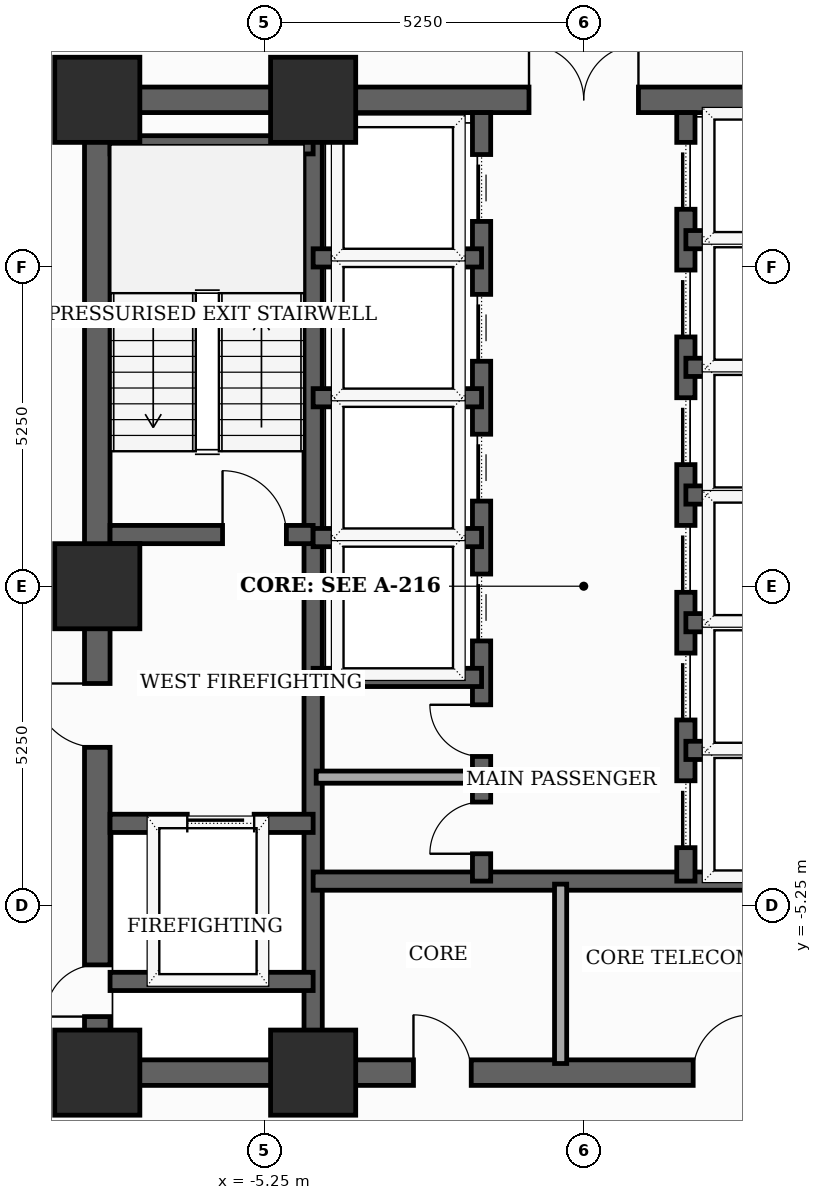
"""IFC4 building model, lengths in metres.
Left out: names, types, materials, properties, quantities, classifications, styles, units other than length and angle.
Written with IfcOpenShell. Run it as: python <this file> out.ifc"""

import sys

from ifc_helpers import new_model, si_unit, direction, frame, frame_2d, origin, origin_2d, place, context, subcontext, project, spatial, rectangle, extrude, element, fill, save


model = new_model("IFC4")
c1 = context("Model", 3, precision=1e-05, world=origin(), true_north=direction((0.0, 1.0)))
c2 = subcontext(c1, "Body", "Model", "MODEL_VIEW")
j1 = project(units=[si_unit("LENGTHUNIT", "METRE"), si_unit("PLANEANGLEUNIT", "RADIAN")], contexts=[c1])
p1 = place(None, origin())
s1 = spatial("IfcSite", under=j1, at=p1, CompositionType="ELEMENT")
p2 = place(p1, origin())
s2 = spatial("IfcBuilding", under=s1, at=p2, CompositionType="ELEMENT")
p3 = place(p2, frame((0.0, 0.0, 97.7)))
s3 = spatial("IfcBuildingStorey", under=s2, at=p3, CompositionType="ELEMENT", Elevation=97.7)
for number, where, z_axis, x_axis in (
    (1, (-8.0, -8.0, 0.0), (0.0, 0.0, 1.0), (1.0, 0.0, 0.0)),
    (2, (-4.45, -8.0, 0.0), (0.0, 0.0, 1.0), (1.0, 0.0, 0.0)),
    (3, (-4.45, 8.0, 0.0), (0.0, 0.0, 1.0), (1.0, 0.0, 0.0)),
    (4, (-8.0, 8.0, 0.0), (0.0, 0.0, 1.0), (1.0, 0.0, 0.0)),
    (5, (-8.0, 0.0, 0.0), (0.0, 0.0, 1.0), (1.0, 0.0, 0.0)),
):
    element("IfcColumn", number, at=place(p3, frame(where, z_axis=z_axis, x_axis=x_axis)), inside=s3, PredefinedType="COLUMN", context=c2, shape_type="SweptSolid", body=[
        extrude(rectangle(XDim=1.4, YDim=1.4, at=origin_2d()), origin(), (0.0, 0.0, 1.0), 3.7),
    ])
p4 = place(p3, frame((-8.0, -8.0, 0.0), z_axis=(0.0, 0.0, 1.0), x_axis=(0.0, 1.0, 0.0)))
e6 = element("IfcWall", 6, at=p4, inside=s3, PredefinedType="SHEAR", context=c2, shape_type="SweptSolid", body=[
    extrude(rectangle(XDim=16.0, YDim=0.42, at=frame_2d((8.0, 0.0))), origin(), (0.0, 0.0, 1.0), 3.5),
])
p5 = place(p4, frame((0.922, 0.0, 0.0)))
e7 = element("IfcOpeningElement", 7, at=p5, cuts=e6, PredefinedType="OPENING", context=c2, shape_type="SweptSolid", body=[
    extrude(rectangle(XDim=0.85, YDim=2.02, at=frame_2d((0.425, 1.01))), frame((0.0, 0.22, 0.0), z_axis=(0.0, -1.0, 0.0), x_axis=(1.0, 0.0, 0.0)), (0.0, 0.0, 1.0), 0.44),
])
p6 = place(p4, frame((5.35, 0.0, 0.0)))
e8 = element("IfcOpeningElement", 8, at=p6, cuts=e6, PredefinedType="OPENING", context=c2, shape_type="SweptSolid", body=[
    extrude(rectangle(XDim=1.05, YDim=2.15, at=frame_2d((0.525, 1.075))), frame((0.0, 0.22, 0.0), z_axis=(0.0, -1.0, 0.0), x_axis=(1.0, 0.0, 0.0)), (0.0, 0.0, 1.0), 0.44),
])
p7 = place(p3, frame((-8.0, -8.0, 0.0), z_axis=(0.0, 0.0, 1.0), x_axis=(1.0, 0.0, 0.0)))
e9 = element("IfcWall", 9, at=p7, inside=s3, PredefinedType="SHEAR", context=c2, shape_type="SweptSolid", body=[
    extrude(rectangle(XDim=16.0, YDim=0.42, at=frame_2d((8.0, 0.0))), origin(), (0.0, 0.0, 1.0), 3.5),
])
p8 = place(p7, frame((5.2, 0.0, 0.0)))
e10 = element("IfcOpeningElement", 10, at=p8, cuts=e9, PredefinedType="OPENING", context=c2, shape_type="SweptSolid", body=[
    extrude(rectangle(XDim=0.95, YDim=2.1, at=frame_2d((0.475, 1.05))), frame((0.0, 0.22, 0.0), z_axis=(0.0, -1.0, 0.0), x_axis=(1.0, 0.0, 0.0)), (0.0, 0.0, 1.0), 0.44),
])
p9 = place(p7, frame((9.8, 0.0, 0.0)))
e11 = element("IfcOpeningElement", 11, at=p9, cuts=e9, PredefinedType="OPENING", context=c2, shape_type="SweptSolid", body=[
    extrude(rectangle(XDim=0.95, YDim=2.1, at=frame_2d((0.475, 1.05))), frame((0.0, 0.22, 0.0), z_axis=(0.0, -1.0, 0.0), x_axis=(1.0, 0.0, 0.0)), (0.0, 0.0, 1.0), 0.44),
])
p10 = place(p3, frame((-8.0, 8.0, 0.0), z_axis=(0.0, 0.0, 1.0), x_axis=(1.0, 0.0, 0.0)))
e12 = element("IfcWall", 12, at=p10, inside=s3, PredefinedType="SHEAR", context=c2, shape_type="SweptSolid", body=[
    extrude(rectangle(XDim=16.0, YDim=0.42, at=frame_2d((8.0, 0.0))), origin(), (0.0, 0.0, 1.0), 3.5),
])
p11 = place(p10, frame((7.1, 0.0, 0.0)))
e13 = element("IfcOpeningElement", 13, at=p11, cuts=e12, PredefinedType="OPENING", context=c2, shape_type="SweptSolid", body=[
    extrude(rectangle(XDim=1.8, YDim=2.15, at=frame_2d((0.9, 1.075))), frame((0.0, 0.22, 0.0), z_axis=(0.0, -1.0, 0.0), x_axis=(1.0, 0.0, 0.0)), (0.0, 0.0, 1.0), 0.44),
])
p12 = place(p3, frame((-4.45, -7.79, 0.0), z_axis=(0.0, 0.0, 1.0), x_axis=(0.0, 1.0, 0.0)))
e14 = element("IfcWall", 14, at=p12, inside=s3, PredefinedType="SHEAR", context=c2, shape_type="SweptSolid", body=[
    extrude(rectangle(XDim=15.58, YDim=0.3, at=frame_2d((7.79, 0.0))), origin(), (0.0, 0.0, 1.0), 3.5),
])
p13 = place(p3, frame((-7.79, 0.85, 0.0), z_axis=(0.0, 0.0, 1.0), x_axis=(1.0, 0.0, 0.0)))
e15 = element("IfcWall", 15, at=p13, inside=s3, PredefinedType="SHEAR", context=c2, shape_type="SweptSolid", body=[
    extrude(rectangle(XDim=3.34, YDim=0.3, at=frame_2d((1.67, 0.0))), origin(), (0.0, 0.0, 1.0), 3.5),
])
p14 = place(p13, frame((1.85, 0.0, 0.0)))
e16 = element("IfcOpeningElement", 16, at=p14, cuts=e15, PredefinedType="OPENING", context=c2, shape_type="SweptSolid", body=[
    extrude(rectangle(XDim=1.05, YDim=2.15, at=frame_2d((0.525, 1.075))), frame((0.0, 0.16, 0.0), z_axis=(0.0, -1.0, 0.0), x_axis=(1.0, 0.0, 0.0)), (0.0, 0.0, 1.0), 0.32),
])
p15 = place(p3, frame((-7.79, 7.26, 0.0), z_axis=(0.0, 0.0, 1.0), x_axis=(1.0, 0.0, 0.0)))
e17 = element("IfcWall", 17, at=p15, inside=s3, PredefinedType="SHEAR", context=c2, shape_type="SweptSolid", body=[
    extrude(rectangle(XDim=3.34, YDim=0.3, at=frame_2d((1.67, 0.0))), origin(), (0.0, 0.0, 1.0), 3.5),
])
p16 = place(p3, frame((-7.79, -3.9, 0.0), z_axis=(0.0, 0.0, 1.0), x_axis=(1.0, 0.0, 0.0)))
e18 = element("IfcWall", 18, at=p16, inside=s3, PredefinedType="SHEAR", context=c2, shape_type="SweptSolid", body=[
    extrude(rectangle(XDim=3.34, YDim=0.3, at=frame_2d((1.67, 0.0))), origin(), (0.0, 0.0, 1.0), 3.5),
])
p17 = place(p16, frame((1.27, 0.0, 0.0)))
e19 = element("IfcOpeningElement", 19, at=p17, cuts=e18, PredefinedType="OPENING", context=c2, shape_type="SweptSolid", body=[
    extrude(rectangle(XDim=1.1, YDim=2.1, at=frame_2d((0.55, 1.05))), frame((0.0, 0.16, 0.0), z_axis=(0.0, -1.0, 0.0), x_axis=(1.0, 0.0, 0.0)), (0.0, 0.0, 1.0), 0.32),
])
p18 = place(p3, frame((-7.79, -6.5, 0.0), z_axis=(0.0, 0.0, 1.0), x_axis=(1.0, 0.0, 0.0)))
e20 = element("IfcWall", 20, at=p18, inside=s3, PredefinedType="SHEAR", context=c2, shape_type="SweptSolid", body=[
    extrude(rectangle(XDim=3.34, YDim=0.3, at=frame_2d((1.67, 0.0))), origin(), (0.0, 0.0, 1.0), 3.5),
])
p19 = place(p3, frame((-4.45, -4.85, 0.0), z_axis=(0.0, 0.0, 1.0), x_axis=(1.0, 0.0, 0.0)))
e21 = element("IfcWall", 21, at=p19, inside=s3, PredefinedType="SHEAR", context=c2, shape_type="SweptSolid", body=[
    extrude(rectangle(XDim=8.9, YDim=0.3, at=frame_2d((4.45, 0.0))), origin(), (0.0, 0.0, 1.0), 3.5),
])
p20 = place(p3, frame((-1.68, -4.85, 0.0), z_axis=(0.0, 0.0, 1.0), x_axis=(0.0, 1.0, 0.0)))
e22 = element("IfcWall", 22, at=p20, inside=s3, PredefinedType="SHEAR", context=c2, shape_type="SweptSolid", body=[
    extrude(rectangle(XDim=12.64, YDim=0.3, at=frame_2d((6.32, 0.0))), origin(), (0.0, 0.0, 1.0), 3.5),
])
p21 = place(p20, frame((3.95, 0.0, 0.0)))
e23 = element("IfcOpeningElement", 23, at=p21, cuts=e22, PredefinedType="OPENING", context=c2, shape_type="SweptSolid", body=[
    extrude(rectangle(XDim=1.1, YDim=2.1, at=frame_2d((0.55, 1.05))), frame((0.0, 0.16, 0.0), z_axis=(0.0, -1.0, 0.0), x_axis=(1.0, 0.0, 0.0)), (0.0, 0.0, 1.0), 0.32),
])
p22 = place(p20, frame((6.25, 0.0, 0.0)))
e24 = element("IfcOpeningElement", 24, at=p22, cuts=e22, PredefinedType="OPENING", context=c2, shape_type="SweptSolid", body=[
    extrude(rectangle(XDim=1.1, YDim=2.1, at=frame_2d((0.55, 1.05))), frame((0.0, 0.16, 0.0), z_axis=(0.0, -1.0, 0.0), x_axis=(1.0, 0.0, 0.0)), (0.0, 0.0, 1.0), 0.32),
])
p23 = place(p20, frame((8.55, 0.0, 0.0)))
e25 = element("IfcOpeningElement", 25, at=p23, cuts=e22, PredefinedType="OPENING", context=c2, shape_type="SweptSolid", body=[
    extrude(rectangle(XDim=1.1, YDim=2.1, at=frame_2d((0.55, 1.05))), frame((0.0, 0.16, 0.0), z_axis=(0.0, -1.0, 0.0), x_axis=(1.0, 0.0, 0.0)), (0.0, 0.0, 1.0), 0.32),
])
p24 = place(p20, frame((10.85, 0.0, 0.0)))
e26 = element("IfcOpeningElement", 26, at=p24, cuts=e22, PredefinedType="OPENING", context=c2, shape_type="SweptSolid", body=[
    extrude(rectangle(XDim=1.1, YDim=2.1, at=frame_2d((0.55, 1.05))), frame((0.0, 0.16, 0.0), z_axis=(0.0, -1.0, 0.0), x_axis=(1.0, 0.0, 0.0)), (0.0, 0.0, 1.0), 0.32),
])
p25 = place(p20, frame((0.45, 0.0, 0.0)))
e27 = element("IfcOpeningElement", 27, at=p25, cuts=e22, PredefinedType="OPENING", context=c2, shape_type="SweptSolid", body=[
    extrude(rectangle(XDim=0.85, YDim=2.02, at=frame_2d((0.425, 1.01))), frame((0.0, 0.16, 0.0), z_axis=(0.0, -1.0, 0.0), x_axis=(1.0, 0.0, 0.0)), (0.0, 0.0, 1.0), 0.32),
])
p26 = place(p20, frame((2.05, 0.0, 0.0)))
e28 = element("IfcOpeningElement", 28, at=p26, cuts=e22, PredefinedType="OPENING", context=c2, shape_type="SweptSolid", body=[
    extrude(rectangle(XDim=0.85, YDim=2.02, at=frame_2d((0.425, 1.01))), frame((0.0, 0.16, 0.0), z_axis=(0.0, -1.0, 0.0), x_axis=(1.0, 0.0, 0.0)), (0.0, 0.0, 1.0), 0.32),
])
p27 = place(p3, frame((1.68, -4.85, 0.0), z_axis=(0.0, 0.0, 1.0), x_axis=(0.0, 1.0, 0.0)))
e29 = element("IfcWall", 29, at=p27, inside=s3, PredefinedType="SHEAR", context=c2, shape_type="SweptSolid", body=[
    extrude(rectangle(XDim=12.64, YDim=0.3, at=frame_2d((6.32, 0.0))), origin(), (0.0, 0.0, 1.0), 3.5),
])
p28 = place(p27, frame((0.55, 0.0, 0.0)))
e30 = element("IfcOpeningElement", 30, at=p28, cuts=e29, PredefinedType="OPENING", context=c2, shape_type="SweptSolid", body=[
    extrude(rectangle(XDim=1.1, YDim=2.1, at=frame_2d((0.55, 1.05))), frame((0.0, 0.16, 0.0), z_axis=(0.0, -1.0, 0.0), x_axis=(1.0, 0.0, 0.0)), (0.0, 0.0, 1.0), 0.32),
])
p29 = place(p27, frame((2.65, 0.0, 0.0)))
e31 = element("IfcOpeningElement", 31, at=p29, cuts=e29, PredefinedType="OPENING", context=c2, shape_type="SweptSolid", body=[
    extrude(rectangle(XDim=1.1, YDim=2.1, at=frame_2d((0.55, 1.05))), frame((0.0, 0.16, 0.0), z_axis=(0.0, -1.0, 0.0), x_axis=(1.0, 0.0, 0.0)), (0.0, 0.0, 1.0), 0.32),
])
p30 = place(p27, frame((4.75, 0.0, 0.0)))
e32 = element("IfcOpeningElement", 32, at=p30, cuts=e29, PredefinedType="OPENING", context=c2, shape_type="SweptSolid", body=[
    extrude(rectangle(XDim=1.1, YDim=2.1, at=frame_2d((0.55, 1.05))), frame((0.0, 0.16, 0.0), z_axis=(0.0, -1.0, 0.0), x_axis=(1.0, 0.0, 0.0)), (0.0, 0.0, 1.0), 0.32),
])
p31 = place(p27, frame((6.85, 0.0, 0.0)))
e33 = element("IfcOpeningElement", 33, at=p31, cuts=e29, PredefinedType="OPENING", context=c2, shape_type="SweptSolid", body=[
    extrude(rectangle(XDim=1.1, YDim=2.1, at=frame_2d((0.55, 1.05))), frame((0.0, 0.16, 0.0), z_axis=(0.0, -1.0, 0.0), x_axis=(1.0, 0.0, 0.0)), (0.0, 0.0, 1.0), 0.32),
])
p32 = place(p27, frame((8.95, 0.0, 0.0)))
e34 = element("IfcOpeningElement", 34, at=p32, cuts=e29, PredefinedType="OPENING", context=c2, shape_type="SweptSolid", body=[
    extrude(rectangle(XDim=1.1, YDim=2.1, at=frame_2d((0.55, 1.05))), frame((0.0, 0.16, 0.0), z_axis=(0.0, -1.0, 0.0), x_axis=(1.0, 0.0, 0.0)), (0.0, 0.0, 1.0), 0.32),
])
p33 = place(p27, frame((11.05, 0.0, 0.0)))
e35 = element("IfcOpeningElement", 35, at=p33, cuts=e29, PredefinedType="OPENING", context=c2, shape_type="SweptSolid", body=[
    extrude(rectangle(XDim=1.1, YDim=2.1, at=frame_2d((0.55, 1.05))), frame((0.0, 0.16, 0.0), z_axis=(0.0, -1.0, 0.0), x_axis=(1.0, 0.0, 0.0)), (0.0, 0.0, 1.0), 0.32),
])
for number, where, z_axis, x_axis in (
    (36, (-4.45, -1.5, 0.0), (0.0, 0.0, 1.0), (1.0, 0.0, 0.0)),
    (37, (-4.45, 0.8, 0.0), (0.0, 0.0, 1.0), (1.0, 0.0, 0.0)),
    (38, (-4.45, 3.1, 0.0), (0.0, 0.0, 1.0), (1.0, 0.0, 0.0)),
    (39, (-4.45, 5.4, 0.0), (0.0, 0.0, 1.0), (1.0, 0.0, 0.0)),
    (40, (1.68, 1.5, 0.0), (0.0, 0.0, 1.0), (1.0, 0.0, 0.0)),
    (41, (1.68, 3.6, 0.0), (0.0, 0.0, 1.0), (1.0, 0.0, 0.0)),
    (42, (1.68, 5.7, 0.0), (0.0, 0.0, 1.0), (1.0, 0.0, 0.0)),
    (43, (1.68, -2.7, 0.0), (0.0, 0.0, 1.0), (1.0, 0.0, 0.0)),
    (44, (1.68, -0.6, 0.0), (0.0, 0.0, 1.0), (1.0, 0.0, 0.0)),
):
    element("IfcWall", number, at=place(p3, frame(where, z_axis=z_axis, x_axis=x_axis)), inside=s3, PredefinedType="SHEAR", context=c2, shape_type="SweptSolid", body=[
        extrude(rectangle(XDim=2.77, YDim=0.3, at=frame_2d((1.385, 0.0))), origin(), (0.0, 0.0, 1.0), 3.5),
    ])
p34 = place(p3, frame((-0.38, -7.85, 0.0), z_axis=(0.0, 0.0, 1.0), x_axis=(0.0, 1.0, 0.0)))
e45 = element("IfcWall", 45, at=p34, inside=s3, PredefinedType="SOLIDWALL", context=c2, shape_type="SweptSolid", body=[
    extrude(rectangle(XDim=2.95, YDim=0.2, at=frame_2d((1.475, 0.0))), origin(), (0.0, 0.0, 1.0), 2.885),
])
p35 = place(p3, frame((-4.4, -3.14, 0.0), z_axis=(0.0, 0.0, 1.0), x_axis=(1.0, 0.0, 0.0)))
e46 = element("IfcWall", 46, at=p35, inside=s3, PredefinedType="SOLIDWALL", context=c2, shape_type="SweptSolid", body=[
    extrude(rectangle(XDim=2.68, YDim=0.2, at=frame_2d((1.34, 0.0))), origin(), (0.0, 0.0, 1.0), 3.5),
])
p36 = place(p5, origin())
e47 = element("IfcDoor", 47, at=p36, inside=s3, OperationType="SINGLE_SWING_LEFT", PredefinedType="TRAPDOOR", context=c2, shape_type="SweptSolid", body=[
    extrude(rectangle(XDim=0.85, YDim=2.02, at=frame_2d((0.425, 1.01))), frame((0.0, 0.025, 0.0), z_axis=(0.0, -1.0, 0.0), x_axis=(1.0, 0.0, 0.0)), (0.0, 0.0, 1.0), 0.05),
])
fill(e7, e47)
p37 = place(p6, origin())
e48 = element("IfcDoor", 48, at=p37, inside=s3, OperationType="SINGLE_SWING_RIGHT", PredefinedType="DOOR", context=c2, shape_type="SweptSolid", body=[
    extrude(rectangle(XDim=1.05, YDim=2.15, at=frame_2d((0.525, 1.075))), frame((0.0, 0.025, 0.0), z_axis=(0.0, -1.0, 0.0), x_axis=(1.0, 0.0, 0.0)), (0.0, 0.0, 1.0), 0.05),
])
fill(e8, e48)
p38 = place(p8, origin())
e49 = element("IfcDoor", 49, at=p38, inside=s3, OperationType="SINGLE_SWING_LEFT", PredefinedType="DOOR", context=c2, shape_type="SweptSolid", body=[
    extrude(rectangle(XDim=0.95, YDim=2.1, at=frame_2d((0.475, 1.05))), frame((0.0, 0.025, 0.0), z_axis=(0.0, -1.0, 0.0), x_axis=(1.0, 0.0, 0.0)), (0.0, 0.0, 1.0), 0.05),
])
fill(e10, e49)
p39 = place(p9, origin())
e50 = element("IfcDoor", 50, at=p39, inside=s3, OperationType="SINGLE_SWING_RIGHT", PredefinedType="DOOR", context=c2, shape_type="SweptSolid", body=[
    extrude(rectangle(XDim=0.95, YDim=2.1, at=frame_2d((0.475, 1.05))), frame((0.0, 0.025, 0.0), z_axis=(0.0, -1.0, 0.0), x_axis=(1.0, 0.0, 0.0)), (0.0, 0.0, 1.0), 0.05),
])
fill(e11, e50)
p40 = place(p11, origin())
e51 = element("IfcDoor", 51, at=p40, inside=s3, OperationType="DOUBLE_DOOR_SINGLE_SWING", PredefinedType="DOOR", context=c2, shape_type="SweptSolid", body=[
    extrude(rectangle(XDim=1.8, YDim=2.15, at=frame_2d((0.9, 1.075))), frame((0.0, 0.025, 0.0), z_axis=(0.0, -1.0, 0.0), x_axis=(1.0, 0.0, 0.0)), (0.0, 0.0, 1.0), 0.05),
])
fill(e13, e51)
p41 = place(p14, origin())
e52 = element("IfcDoor", 52, at=p41, inside=s3, OperationType="SINGLE_SWING_LEFT", PredefinedType="DOOR", context=c2, shape_type="SweptSolid", body=[
    extrude(rectangle(XDim=1.05, YDim=2.15, at=frame_2d((0.525, 1.075))), frame((0.0, 0.025, 0.0), z_axis=(0.0, -1.0, 0.0), x_axis=(1.0, 0.0, 0.0)), (0.0, 0.0, 1.0), 0.05),
])
fill(e16, e52)
p42 = place(p17, origin())
e53 = element("IfcDoor", 53, at=p42, inside=s3, OperationType="SLIDING_TO_LEFT", PredefinedType="DOOR", context=c2, shape_type="SweptSolid", body=[
    extrude(rectangle(XDim=1.1, YDim=2.1, at=frame_2d((0.55, 1.05))), frame((0.0, 0.025, 0.0), z_axis=(0.0, -1.0, 0.0), x_axis=(1.0, 0.0, 0.0)), (0.0, 0.0, 1.0), 0.05),
])
fill(e19, e53)
p43 = place(p21, origin())
e54 = element("IfcDoor", 54, at=p43, inside=s3, OperationType="SLIDING_TO_LEFT", PredefinedType="DOOR", context=c2, shape_type="SweptSolid", body=[
    extrude(rectangle(XDim=1.1, YDim=2.1, at=frame_2d((0.55, 1.05))), frame((0.0, 0.025, 0.0), z_axis=(0.0, -1.0, 0.0), x_axis=(1.0, 0.0, 0.0)), (0.0, 0.0, 1.0), 0.05),
])
fill(e23, e54)
p44 = place(p22, origin())
e55 = element("IfcDoor", 55, at=p44, inside=s3, OperationType="SLIDING_TO_LEFT", PredefinedType="DOOR", context=c2, shape_type="SweptSolid", body=[
    extrude(rectangle(XDim=1.1, YDim=2.1, at=frame_2d((0.55, 1.05))), frame((0.0, 0.025, 0.0), z_axis=(0.0, -1.0, 0.0), x_axis=(1.0, 0.0, 0.0)), (0.0, 0.0, 1.0), 0.05),
])
fill(e24, e55)
p45 = place(p23, origin())
e56 = element("IfcDoor", 56, at=p45, inside=s3, OperationType="SLIDING_TO_LEFT", PredefinedType="DOOR", context=c2, shape_type="SweptSolid", body=[
    extrude(rectangle(XDim=1.1, YDim=2.1, at=frame_2d((0.55, 1.05))), frame((0.0, 0.025, 0.0), z_axis=(0.0, -1.0, 0.0), x_axis=(1.0, 0.0, 0.0)), (0.0, 0.0, 1.0), 0.05),
])
fill(e25, e56)
p46 = place(p24, origin())
e57 = element("IfcDoor", 57, at=p46, inside=s3, OperationType="SLIDING_TO_LEFT", PredefinedType="DOOR", context=c2, shape_type="SweptSolid", body=[
    extrude(rectangle(XDim=1.1, YDim=2.1, at=frame_2d((0.55, 1.05))), frame((0.0, 0.025, 0.0), z_axis=(0.0, -1.0, 0.0), x_axis=(1.0, 0.0, 0.0)), (0.0, 0.0, 1.0), 0.05),
])
fill(e26, e57)
p47 = place(p25, origin())
e58 = element("IfcDoor", 58, at=p47, inside=s3, OperationType="SINGLE_SWING_LEFT", PredefinedType="TRAPDOOR", context=c2, shape_type="SweptSolid", body=[
    extrude(rectangle(XDim=0.85, YDim=2.02, at=frame_2d((0.425, 1.01))), frame((0.0, 0.025, 0.0), z_axis=(0.0, -1.0, 0.0), x_axis=(1.0, 0.0, 0.0)), (0.0, 0.0, 1.0), 0.05),
])
fill(e27, e58)
p48 = place(p26, origin())
e59 = element("IfcDoor", 59, at=p48, inside=s3, OperationType="SINGLE_SWING_RIGHT", PredefinedType="TRAPDOOR", context=c2, shape_type="SweptSolid", body=[
    extrude(rectangle(XDim=0.85, YDim=2.02, at=frame_2d((0.425, 1.01))), frame((0.0, 0.025, 0.0), z_axis=(0.0, -1.0, 0.0), x_axis=(1.0, 0.0, 0.0)), (0.0, 0.0, 1.0), 0.05),
])
fill(e28, e59)
p49 = place(p28, origin())
e60 = element("IfcDoor", 60, at=p49, inside=s3, OperationType="SLIDING_TO_LEFT", PredefinedType="DOOR", context=c2, shape_type="SweptSolid", body=[
    extrude(rectangle(XDim=1.1, YDim=2.1, at=frame_2d((0.55, 1.05))), frame((0.0, 0.025, 0.0), z_axis=(0.0, -1.0, 0.0), x_axis=(1.0, 0.0, 0.0)), (0.0, 0.0, 1.0), 0.05),
])
fill(e30, e60)
p50 = place(p29, origin())
e61 = element("IfcDoor", 61, at=p50, inside=s3, OperationType="SLIDING_TO_LEFT", PredefinedType="DOOR", context=c2, shape_type="SweptSolid", body=[
    extrude(rectangle(XDim=1.1, YDim=2.1, at=frame_2d((0.55, 1.05))), frame((0.0, 0.025, 0.0), z_axis=(0.0, -1.0, 0.0), x_axis=(1.0, 0.0, 0.0)), (0.0, 0.0, 1.0), 0.05),
])
fill(e31, e61)
p51 = place(p30, origin())
e62 = element("IfcDoor", 62, at=p51, inside=s3, OperationType="SLIDING_TO_LEFT", PredefinedType="DOOR", context=c2, shape_type="SweptSolid", body=[
    extrude(rectangle(XDim=1.1, YDim=2.1, at=frame_2d((0.55, 1.05))), frame((0.0, 0.025, 0.0), z_axis=(0.0, -1.0, 0.0), x_axis=(1.0, 0.0, 0.0)), (0.0, 0.0, 1.0), 0.05),
])
fill(e32, e62)
p52 = place(p31, origin())
e63 = element("IfcDoor", 63, at=p52, inside=s3, OperationType="SLIDING_TO_LEFT", PredefinedType="DOOR", context=c2, shape_type="SweptSolid", body=[
    extrude(rectangle(XDim=1.1, YDim=2.1, at=frame_2d((0.55, 1.05))), frame((0.0, 0.025, 0.0), z_axis=(0.0, -1.0, 0.0), x_axis=(1.0, 0.0, 0.0)), (0.0, 0.0, 1.0), 0.05),
])
fill(e33, e63)
p53 = place(p32, origin())
e64 = element("IfcDoor", 64, at=p53, inside=s3, OperationType="SLIDING_TO_LEFT", PredefinedType="DOOR", context=c2, shape_type="SweptSolid", body=[
    extrude(rectangle(XDim=1.1, YDim=2.1, at=frame_2d((0.55, 1.05))), frame((0.0, 0.025, 0.0), z_axis=(0.0, -1.0, 0.0), x_axis=(1.0, 0.0, 0.0)), (0.0, 0.0, 1.0), 0.05),
])
fill(e34, e64)
p54 = place(p33, origin())
e65 = element("IfcDoor", 65, at=p54, inside=s3, OperationType="SLIDING_TO_LEFT", PredefinedType="DOOR", context=c2, shape_type="SweptSolid", body=[
    extrude(rectangle(XDim=1.1, YDim=2.1, at=frame_2d((0.55, 1.05))), frame((0.0, 0.025, 0.0), z_axis=(0.0, -1.0, 0.0), x_axis=(1.0, 0.0, 0.0)), (0.0, 0.0, 1.0), 0.05),
])
fill(e35, e65)
save(model, sys.argv[1])
